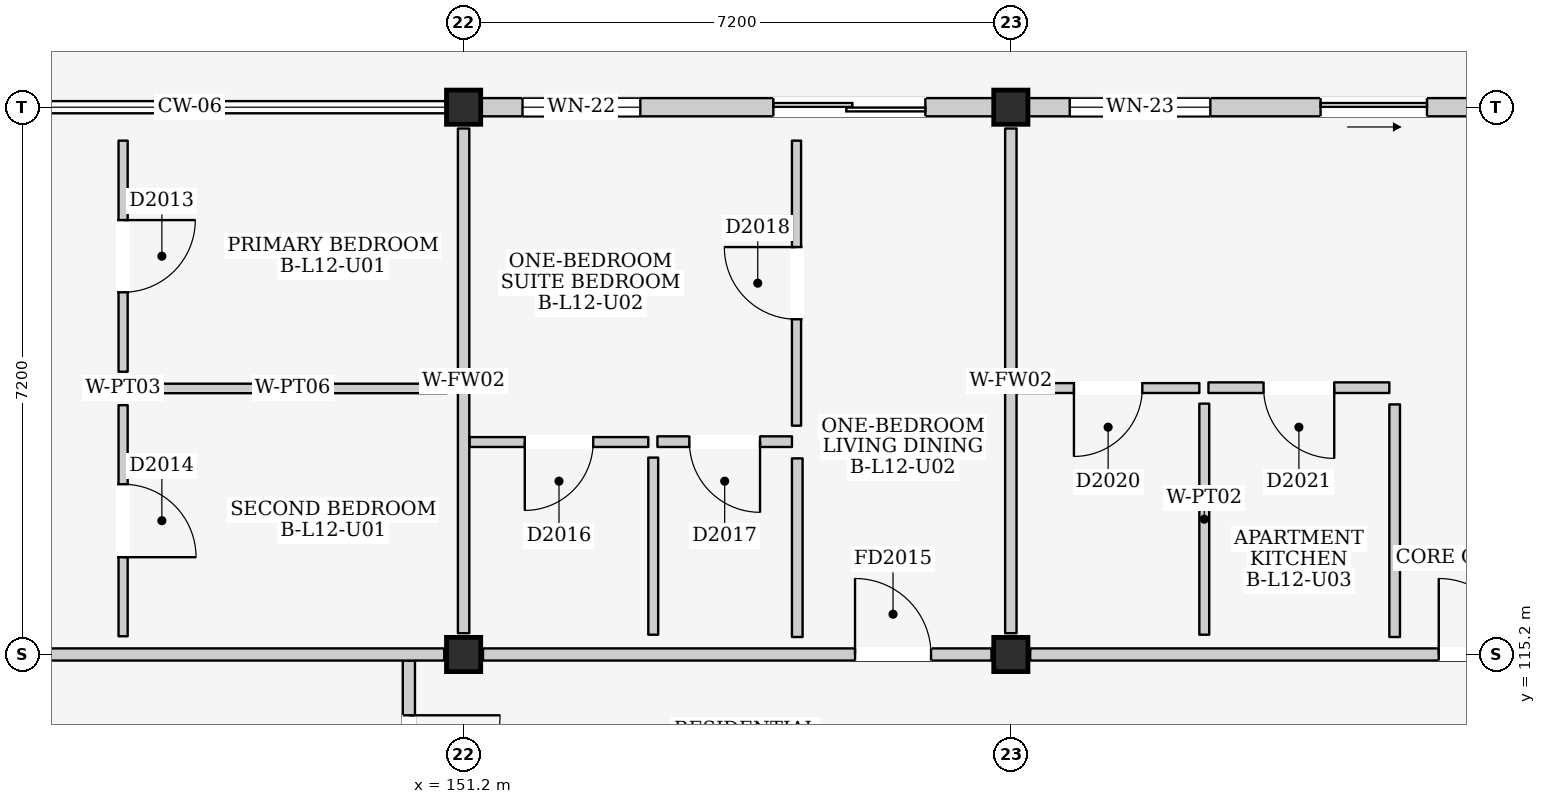
"""IFC4 building model, lengths in metres.
Left out: names, types, materials, properties, quantities, classifications, styles, units other than length and angle.
Written with IfcOpenShell. Run it as: python <this file> out.ifc"""

import sys

from ifc_helpers import new_model, si_unit, direction, frame, frame_2d, origin, origin_2d, place, context, subcontext, project, spatial, rectangle, extrude, element, fill, save


model = new_model("IFC4")
c1 = context("Model", 3, precision=1e-05, world=origin(), true_north=direction((0.0, 1.0)))
c2 = subcontext(c1, "Body", "Model", "MODEL_VIEW")
j1 = project(units=[si_unit("LENGTHUNIT", "METRE"), si_unit("PLANEANGLEUNIT", "RADIAN")], contexts=[c1])
p1 = place(None, origin())
s1 = spatial("IfcSite", under=j1, at=p1, CompositionType="ELEMENT")
p2 = place(p1, origin())
s2 = spatial("IfcBuilding", under=s1, at=p2, CompositionType="ELEMENT")
p3 = place(p2, frame((0.0, 0.0, 41.2)))
s3 = spatial("IfcBuildingStorey", under=s2, at=p3, CompositionType="ELEMENT", Elevation=41.2)
for number, where, z_axis, x_axis in (
    (1, (151.2, 115.2, 0.0), (0.0, 0.0, 1.0), (1.0, 0.0, 0.0)),
    (2, (151.2, 122.4, 0.0), (0.0, 0.0, 1.0), (1.0, 0.0, 0.0)),
    (3, (158.4, 115.2, 0.0), (0.0, 0.0, 1.0), (1.0, 0.0, 0.0)),
    (4, (158.4, 122.4, 0.0), (0.0, 0.0, 1.0), (1.0, 0.0, 0.0)),
):
    element("IfcColumn", number, at=place(p3, frame(where, z_axis=z_axis, x_axis=x_axis)), inside=s3, PredefinedType="COLUMN", context=c2, shape_type="SweptSolid", body=[
        extrude(rectangle(XDim=0.45, YDim=0.45, at=origin_2d()), origin(), (0.0, 0.0, 1.0), 3.2),
    ])
p4 = place(p3, frame((151.425, 122.4, 0.0), z_axis=(0.0, 0.0, 1.0), x_axis=(1.0, 0.0, 0.0)))
e5 = element("IfcWall", 5, at=p4, inside=s3, PredefinedType="ELEMENTEDWALL", context=c2, shape_type="SweptSolid", body=[
    extrude(rectangle(XDim=6.75, YDim=0.24, at=frame_2d((3.375, 0.0))), origin(), (0.0, 0.0, 1.0), 2.495),
])
p5 = place(p4, frame((3.85, 0.0, 0.0)))
e6 = element("IfcOpeningElement", 6, at=p5, cuts=e5, PredefinedType="OPENING", context=c2, shape_type="SweptSolid", body=[
    extrude(rectangle(XDim=2.0, YDim=2.12, at=frame_2d((1.0, 1.06))), frame((0.0, 0.135, 0.0), z_axis=(0.0, -1.0, 0.0), x_axis=(1.0, 0.0, 0.0)), (0.0, 0.0, 1.0), 0.27),
])
p6 = place(p4, frame((0.55, 0.0, 0.9)))
e7 = element("IfcOpeningElement", 7, at=p6, cuts=e5, PredefinedType="OPENING", context=c2, shape_type="SweptSolid", body=[
    extrude(rectangle(XDim=1.55, YDim=1.45, at=frame_2d((0.775, 0.725))), frame((0.0, 0.135, 0.0), z_axis=(0.0, -1.0, 0.0), x_axis=(1.0, 0.0, 0.0)), (0.0, 0.0, 1.0), 0.27),
])
p7 = place(p3, frame((158.625, 122.4, 0.0), z_axis=(0.0, 0.0, 1.0), x_axis=(1.0, 0.0, 0.0)))
e8 = element("IfcWall", 8, at=p7, inside=s3, PredefinedType="ELEMENTEDWALL", context=c2, shape_type="SweptSolid", body=[
    extrude(rectangle(XDim=6.75, YDim=0.24, at=frame_2d((3.375, 0.0))), origin(), (0.0, 0.0, 1.0), 2.495),
])
p8 = place(p7, frame((3.85, 0.0, 0.0)))
e9 = element("IfcOpeningElement", 9, at=p8, cuts=e8, PredefinedType="OPENING", context=c2, shape_type="SweptSolid", body=[
    extrude(rectangle(XDim=1.4, YDim=2.1, at=frame_2d((0.7, 1.05))), frame((0.0, 0.135, 0.0), z_axis=(0.0, -1.0, 0.0), x_axis=(1.0, 0.0, 0.0)), (0.0, 0.0, 1.0), 0.27),
])
p9 = place(p7, frame((0.55, 0.0, 0.9)))
e10 = element("IfcOpeningElement", 10, at=p9, cuts=e8, PredefinedType="OPENING", context=c2, shape_type="SweptSolid", body=[
    extrude(rectangle(XDim=1.85, YDim=1.4, at=frame_2d((0.925, 0.7))), frame((0.0, 0.135, 0.0), z_axis=(0.0, -1.0, 0.0), x_axis=(1.0, 0.0, 0.0)), (0.0, 0.0, 1.0), 0.27),
])
p10 = place(p3, frame((150.48, 111.1, 0.0), z_axis=(0.0, 0.0, 1.0), x_axis=(0.0, 1.0, 0.0)))
e11 = element("IfcWall", 11, at=p10, inside=s3, PredefinedType="PARTITIONING", context=c2, shape_type="SweptSolid", body=[
    extrude(rectangle(XDim=4.02, YDim=0.16, at=frame_2d((2.01, 0.0))), origin(), (0.0, 0.0, 1.0), 2.95),
])
p11 = place(p10, frame((2.1, 0.0, 0.0)))
e12 = element("IfcOpeningElement", 12, at=p11, cuts=e11, PredefinedType="OPENING", context=c2, shape_type="SweptSolid", body=[
    extrude(rectangle(XDim=1.2, YDim=2.2, at=frame_2d((0.6, 1.1))), frame((0.0, 0.095, 0.0), z_axis=(0.0, -1.0, 0.0), x_axis=(1.0, 0.0, 0.0)), (0.0, 0.0, 1.0), 0.19),
])
p12 = place(p3, frame((144.255, 115.2, 0.0), z_axis=(0.0, 0.0, 1.0), x_axis=(1.0, 0.0, 0.0)))
e13 = element("IfcWall", 13, at=p12, inside=s3, PredefinedType="PARTITIONING", context=c2, shape_type="SweptSolid", body=[
    extrude(rectangle(XDim=6.69, YDim=0.16, at=frame_2d((3.345, 0.0))), origin(), (0.0, 0.0, 1.0), 2.345),
])
p13 = place(p3, frame((151.2, 115.48, 0.0), z_axis=(0.0, 0.0, 1.0), x_axis=(0.0, 1.0, 0.0)))
e14 = element("IfcWall", 14, at=p13, inside=s3, PredefinedType="PARTITIONING", context=c2, shape_type="SweptSolid", body=[
    extrude(rectangle(XDim=6.64, YDim=0.15, at=frame_2d((3.32, 0.0))), origin(), (0.0, 0.0, 1.0), 2.445),
])
p14 = place(p3, frame((146.72, 118.92, 0.0), z_axis=(0.0, 0.0, 1.0), x_axis=(0.0, 1.0, 0.0)))
e15 = element("IfcWall", 15, at=p14, inside=s3, PredefinedType="PARTITIONING", context=c2, shape_type="SweptSolid", body=[
    extrude(rectangle(XDim=3.04, YDim=0.12, at=frame_2d((1.52, 0.0))), origin(), (0.0, 0.0, 1.0), 2.95),
])
p15 = place(p14, frame((1.045, 0.0, 0.0)))
e16 = element("IfcOpeningElement", 16, at=p15, cuts=e15, PredefinedType="OPENING", context=c2, shape_type="SweptSolid", body=[
    extrude(rectangle(XDim=0.95, YDim=2.15, at=frame_2d((0.475, 1.075))), frame((0.0, 0.075, 0.0), z_axis=(0.0, -1.0, 0.0), x_axis=(1.0, 0.0, 0.0)), (0.0, 0.0, 1.0), 0.15),
])
p16 = place(p3, frame((146.92, 118.7, 0.0), z_axis=(0.0, 0.0, 1.0), x_axis=(1.0, 0.0, 0.0)))
e17 = element("IfcWall", 17, at=p16, inside=s3, PredefinedType="PARTITIONING", context=c2, shape_type="SweptSolid", body=[
    extrude(rectangle(XDim=4.06, YDim=0.125, at=frame_2d((2.03, 0.0))), origin(), (0.0, 0.0, 1.0), 2.95),
])
p17 = place(p3, frame((146.72, 115.44, 0.0), z_axis=(0.0, 0.0, 1.0), x_axis=(0.0, 1.0, 0.0)))
e18 = element("IfcWall", 18, at=p17, inside=s3, PredefinedType="PARTITIONING", context=c2, shape_type="SweptSolid", body=[
    extrude(rectangle(XDim=3.04, YDim=0.12, at=frame_2d((1.52, 0.0))), origin(), (0.0, 0.0, 1.0), 2.95),
])
p18 = place(p17, frame((1.04, 0.0, 0.0)))
e19 = element("IfcOpeningElement", 19, at=p18, cuts=e18, PredefinedType="OPENING", context=c2, shape_type="SweptSolid", body=[
    extrude(rectangle(XDim=0.96, YDim=2.15, at=frame_2d((0.48, 1.075))), frame((0.0, 0.075, 0.0), z_axis=(0.0, -1.0, 0.0), x_axis=(1.0, 0.0, 0.0)), (0.0, 0.0, 1.0), 0.15),
])
p19 = place(p3, frame((151.455, 115.2, 0.0), z_axis=(0.0, 0.0, 1.0), x_axis=(1.0, 0.0, 0.0)))
e20 = element("IfcWall", 20, at=p19, inside=s3, PredefinedType="PARTITIONING", context=c2, shape_type="SweptSolid", body=[
    extrude(rectangle(XDim=6.69, YDim=0.16, at=frame_2d((3.345, 0.0))), origin(), (0.0, 0.0, 1.0), 2.345),
])
p20 = place(p19, frame((4.895, 0.0, 0.0)))
e21 = element("IfcOpeningElement", 21, at=p20, cuts=e20, PredefinedType="OPENING", context=c2, shape_type="SweptSolid", body=[
    extrude(rectangle(XDim=1.0, YDim=2.15, at=frame_2d((0.5, 1.075))), frame((0.0, 0.095, 0.0), z_axis=(0.0, -1.0, 0.0), x_axis=(1.0, 0.0, 0.0)), (0.0, 0.0, 1.0), 0.19),
])
p21 = place(p3, frame((158.4, 115.48, 0.0), z_axis=(0.0, 0.0, 1.0), x_axis=(0.0, 1.0, 0.0)))
e22 = element("IfcWall", 22, at=p21, inside=s3, PredefinedType="PARTITIONING", context=c2, shape_type="SweptSolid", body=[
    extrude(rectangle(XDim=6.64, YDim=0.15, at=frame_2d((3.32, 0.0))), origin(), (0.0, 0.0, 1.0), 2.445),
])
p22 = place(p3, frame((151.28, 117.995, 0.0), z_axis=(0.0, 0.0, 1.0), x_axis=(1.0, 0.0, 0.0)))
e23 = element("IfcWall", 23, at=p22, inside=s3, PredefinedType="PARTITIONING", context=c2, shape_type="SweptSolid", body=[
    extrude(rectangle(XDim=2.35, YDim=0.13, at=frame_2d((1.175, 0.0))), origin(), (0.0, 0.0, 1.0), 2.95),
])
p23 = place(p22, frame((0.725, 0.0, 0.0)))
e24 = element("IfcOpeningElement", 24, at=p23, cuts=e23, PredefinedType="OPENING", context=c2, shape_type="SweptSolid", body=[
    extrude(rectangle(XDim=0.9, YDim=2.1, at=frame_2d((0.45, 1.05))), frame((0.0, 0.08, 0.0), z_axis=(0.0, -1.0, 0.0), x_axis=(1.0, 0.0, 0.0)), (0.0, 0.0, 1.0), 0.16),
])
p24 = place(p3, frame((153.695, 115.46, 0.0), z_axis=(0.0, 0.0, 1.0), x_axis=(0.0, 1.0, 0.0)))
e25 = element("IfcWall", 25, at=p24, inside=s3, PredefinedType="PARTITIONING", context=c2, shape_type="SweptSolid", body=[
    extrude(rectangle(XDim=2.33, YDim=0.13, at=frame_2d((1.165, 0.0))), origin(), (0.0, 0.0, 1.0), 2.95),
])
p25 = place(p3, frame((153.75, 118.0, 0.0), z_axis=(0.0, 0.0, 1.0), x_axis=(1.0, 0.0, 0.0)))
e26 = element("IfcWall", 26, at=p25, inside=s3, PredefinedType="PARTITIONING", context=c2, shape_type="SweptSolid", body=[
    extrude(rectangle(XDim=1.77, YDim=0.14, at=frame_2d((0.885, 0.0))), origin(), (0.0, 0.0, 1.0), 2.95),
])
p26 = place(p25, frame((0.42, 0.0, 0.0)))
e27 = element("IfcOpeningElement", 27, at=p26, cuts=e26, PredefinedType="OPENING", context=c2, shape_type="SweptSolid", body=[
    extrude(rectangle(XDim=0.93, YDim=2.14, at=frame_2d((0.465, 1.07))), frame((0.0, 0.085, 0.0), z_axis=(0.0, -1.0, 0.0), x_axis=(1.0, 0.0, 0.0)), (0.0, 0.0, 1.0), 0.17),
])
p27 = place(p3, frame((155.59, 115.43, 0.0), z_axis=(0.0, 0.0, 1.0), x_axis=(0.0, 1.0, 0.0)))
e28 = element("IfcWall", 28, at=p27, inside=s3, PredefinedType="PARTITIONING", context=c2, shape_type="SweptSolid", body=[
    extrude(rectangle(XDim=2.35, YDim=0.14, at=frame_2d((1.175, 0.0))), origin(), (0.0, 0.0, 1.0), 2.95),
])
p28 = place(p3, frame((155.58, 118.21, 0.0), z_axis=(0.0, 0.0, 1.0), x_axis=(0.0, 1.0, 0.0)))
e29 = element("IfcWall", 29, at=p28, inside=s3, PredefinedType="PARTITIONING", context=c2, shape_type="SweptSolid", body=[
    extrude(rectangle(XDim=3.75, YDim=0.12, at=frame_2d((1.875, 0.0))), origin(), (0.0, 0.0, 1.0), 2.95),
])
p29 = place(p28, frame((1.4, 0.0, 0.0)))
e30 = element("IfcOpeningElement", 30, at=p29, cuts=e29, PredefinedType="OPENING", context=c2, shape_type="SweptSolid", body=[
    extrude(rectangle(XDim=0.95, YDim=2.15, at=frame_2d((0.475, 1.075))), frame((0.0, 0.075, 0.0), z_axis=(0.0, -1.0, 0.0), x_axis=(1.0, 0.0, 0.0)), (0.0, 0.0, 1.0), 0.15),
])
p30 = place(p3, frame((158.655, 115.2, 0.0), z_axis=(0.0, 0.0, 1.0), x_axis=(1.0, 0.0, 0.0)))
e31 = element("IfcWall", 31, at=p30, inside=s3, PredefinedType="PARTITIONING", context=c2, shape_type="SweptSolid", body=[
    extrude(rectangle(XDim=6.69, YDim=0.16, at=frame_2d((3.345, 0.0))), origin(), (0.0, 0.0, 1.0), 2.345),
])
p31 = place(p30, frame((5.375, 0.0, 0.0)))
e32 = element("IfcOpeningElement", 32, at=p31, cuts=e31, PredefinedType="OPENING", context=c2, shape_type="SweptSolid", body=[
    extrude(rectangle(XDim=1.0, YDim=2.15, at=frame_2d((0.5, 1.075))), frame((0.0, 0.095, 0.0), z_axis=(0.0, -1.0, 0.0), x_axis=(1.0, 0.0, 0.0)), (0.0, 0.0, 1.0), 0.19),
])
p32 = place(p3, frame((158.48, 118.705, 0.0), z_axis=(0.0, 0.0, 1.0), x_axis=(1.0, 0.0, 0.0)))
e33 = element("IfcWall", 33, at=p32, inside=s3, PredefinedType="PARTITIONING", context=c2, shape_type="SweptSolid", body=[
    extrude(rectangle(XDim=2.4, YDim=0.13, at=frame_2d((1.2, 0.0))), origin(), (0.0, 0.0, 1.0), 2.95),
])
p33 = place(p32, frame((0.75, 0.0, 0.0)))
e34 = element("IfcOpeningElement", 34, at=p33, cuts=e33, PredefinedType="OPENING", context=c2, shape_type="SweptSolid", body=[
    extrude(rectangle(XDim=0.9, YDim=2.1, at=frame_2d((0.45, 1.05))), frame((0.0, 0.08, 0.0), z_axis=(0.0, -1.0, 0.0), x_axis=(1.0, 0.0, 0.0)), (0.0, 0.0, 1.0), 0.16),
])
p34 = place(p3, frame((160.945, 115.46, 0.0), z_axis=(0.0, 0.0, 1.0), x_axis=(0.0, 1.0, 0.0)))
e35 = element("IfcWall", 35, at=p34, inside=s3, PredefinedType="PARTITIONING", context=c2, shape_type="SweptSolid", body=[
    extrude(rectangle(XDim=3.04, YDim=0.13, at=frame_2d((1.52, 0.0))), origin(), (0.0, 0.0, 1.0), 2.95),
])
p35 = place(p3, frame((161.0, 118.71, 0.0), z_axis=(0.0, 0.0, 1.0), x_axis=(1.0, 0.0, 0.0)))
e36 = element("IfcWall", 36, at=p35, inside=s3, PredefinedType="PARTITIONING", context=c2, shape_type="SweptSolid", body=[
    extrude(rectangle(XDim=2.38, YDim=0.14, at=frame_2d((1.19, 0.0))), origin(), (0.0, 0.0, 1.0), 2.95),
])
p36 = place(p35, frame((0.725, 0.0, 0.0)))
e37 = element("IfcOpeningElement", 37, at=p36, cuts=e36, PredefinedType="OPENING", context=c2, shape_type="SweptSolid", body=[
    extrude(rectangle(XDim=0.93, YDim=2.14, at=frame_2d((0.465, 1.07))), frame((0.0, 0.085, 0.0), z_axis=(0.0, -1.0, 0.0), x_axis=(1.0, 0.0, 0.0)), (0.0, 0.0, 1.0), 0.17),
])
p37 = place(p3, frame((163.45, 115.43, 0.0), z_axis=(0.0, 0.0, 1.0), x_axis=(0.0, 1.0, 0.0)))
e38 = element("IfcWall", 38, at=p37, inside=s3, PredefinedType="PARTITIONING", context=c2, shape_type="SweptSolid", body=[
    extrude(rectangle(XDim=3.06, YDim=0.14, at=frame_2d((1.53, 0.0))), origin(), (0.0, 0.0, 1.0), 2.95),
])
p38 = place(p5, frame((2.0, 0.0, 0.0), z_axis=(0.0, 0.0, 1.0), x_axis=(-1.0, 0.0, 0.0)))
e39 = element("IfcDoor", 39, at=p38, inside=s3, OperationType="DOUBLE_DOOR_SLIDING", PredefinedType="DOOR", context=c2, shape_type="SweptSolid", body=[
    extrude(rectangle(XDim=2.0, YDim=2.12, at=frame_2d((1.0, 1.06))), frame((0.0, 0.025, 0.0), z_axis=(0.0, -1.0, 0.0), x_axis=(1.0, 0.0, 0.0)), (0.0, 0.0, 1.0), 0.05),
])
fill(e6, e39)
p39 = place(p6, origin())
e40 = element("IfcWindow", 40, at=p39, inside=s3, PartitioningType="DOUBLE_PANEL_VERTICAL", PredefinedType="WINDOW", context=c2, shape_type="SweptSolid", body=[
    extrude(rectangle(XDim=1.55, YDim=1.45, at=frame_2d((0.775, 0.725))), frame((0.0, 0.03, 0.0), z_axis=(0.0, -1.0, 0.0), x_axis=(1.0, 0.0, 0.0)), (0.0, 0.0, 1.0), 0.06),
])
fill(e7, e40)
p40 = place(p8, frame((1.4, 0.0, 0.0), z_axis=(0.0, 0.0, 1.0), x_axis=(-1.0, 0.0, 0.0)))
e41 = element("IfcDoor", 41, at=p40, inside=s3, OperationType="SLIDING_TO_RIGHT", PredefinedType="DOOR", context=c2, shape_type="SweptSolid", body=[
    extrude(rectangle(XDim=1.4, YDim=2.1, at=frame_2d((0.7, 1.05))), frame((0.0, 0.025, 0.0), z_axis=(0.0, -1.0, 0.0), x_axis=(1.0, 0.0, 0.0)), (0.0, 0.0, 1.0), 0.05),
])
fill(e9, e41)
p41 = place(p9, origin())
e42 = element("IfcWindow", 42, at=p41, inside=s3, PartitioningType="DOUBLE_PANEL_VERTICAL", PredefinedType="WINDOW", context=c2, shape_type="SweptSolid", body=[
    extrude(rectangle(XDim=1.85, YDim=1.4, at=frame_2d((0.925, 0.7))), frame((0.0, 0.03, 0.0), z_axis=(0.0, -1.0, 0.0), x_axis=(1.0, 0.0, 0.0)), (0.0, 0.0, 1.0), 0.06),
])
fill(e10, e42)
p42 = place(p11, frame((1.2, 0.0, 0.0), z_axis=(0.0, 0.0, 1.0), x_axis=(-1.0, 0.0, 0.0)))
e43 = element("IfcDoor", 43, at=p42, inside=s3, OperationType="SINGLE_SWING_LEFT", PredefinedType="DOOR", context=c2, shape_type="SweptSolid", body=[
    extrude(rectangle(XDim=1.2, YDim=2.2, at=frame_2d((0.6, 1.1))), frame((0.0, 0.025, 0.0), z_axis=(0.0, -1.0, 0.0), x_axis=(1.0, 0.0, 0.0)), (0.0, 0.0, 1.0), 0.05),
])
fill(e12, e43)
p43 = place(p15, frame((0.95, 0.0, 0.0), z_axis=(0.0, 0.0, 1.0), x_axis=(-1.0, 0.0, 0.0)))
e44 = element("IfcDoor", 44, at=p43, inside=s3, OperationType="SINGLE_SWING_LEFT", PredefinedType="DOOR", context=c2, shape_type="SweptSolid", body=[
    extrude(rectangle(XDim=0.95, YDim=2.15, at=frame_2d((0.475, 1.075))), frame((0.0, 0.025, 0.0), z_axis=(0.0, -1.0, 0.0), x_axis=(1.0, 0.0, 0.0)), (0.0, 0.0, 1.0), 0.05),
])
fill(e16, e44)
p44 = place(p18, frame((0.96, 0.0, 0.0), z_axis=(0.0, 0.0, 1.0), x_axis=(-1.0, 0.0, 0.0)))
e45 = element("IfcDoor", 45, at=p44, inside=s3, OperationType="SINGLE_SWING_RIGHT", PredefinedType="DOOR", context=c2, shape_type="SweptSolid", body=[
    extrude(rectangle(XDim=0.96, YDim=2.15, at=frame_2d((0.48, 1.075))), frame((0.0, 0.025, 0.0), z_axis=(0.0, -1.0, 0.0), x_axis=(1.0, 0.0, 0.0)), (0.0, 0.0, 1.0), 0.05),
])
fill(e19, e45)
p45 = place(p20, origin())
e46 = element("IfcDoor", 46, at=p45, inside=s3, OperationType="SINGLE_SWING_LEFT", PredefinedType="DOOR", context=c2, shape_type="SweptSolid", body=[
    extrude(rectangle(XDim=1.0, YDim=2.15, at=frame_2d((0.5, 1.075))), frame((0.0, 0.025, 0.0), z_axis=(0.0, -1.0, 0.0), x_axis=(1.0, 0.0, 0.0)), (0.0, 0.0, 1.0), 0.05),
])
fill(e21, e46)
p46 = place(p23, frame((0.9, 0.0, 0.0), z_axis=(0.0, 0.0, 1.0), x_axis=(-1.0, 0.0, 0.0)))
e47 = element("IfcDoor", 47, at=p46, inside=s3, OperationType="SINGLE_SWING_RIGHT", PredefinedType="DOOR", context=c2, shape_type="SweptSolid", body=[
    extrude(rectangle(XDim=0.9, YDim=2.1, at=frame_2d((0.45, 1.05))), frame((0.0, 0.025, 0.0), z_axis=(0.0, -1.0, 0.0), x_axis=(1.0, 0.0, 0.0)), (0.0, 0.0, 1.0), 0.05),
])
fill(e24, e47)
p47 = place(p26, frame((0.93, 0.0, 0.0), z_axis=(0.0, 0.0, 1.0), x_axis=(-1.0, 0.0, 0.0)))
e48 = element("IfcDoor", 48, at=p47, inside=s3, OperationType="SINGLE_SWING_LEFT", PredefinedType="DOOR", context=c2, shape_type="SweptSolid", body=[
    extrude(rectangle(XDim=0.93, YDim=2.14, at=frame_2d((0.465, 1.07))), frame((0.0, 0.025, 0.0), z_axis=(0.0, -1.0, 0.0), x_axis=(1.0, 0.0, 0.0)), (0.0, 0.0, 1.0), 0.05),
])
fill(e27, e48)
p48 = place(p29, origin())
e49 = element("IfcDoor", 49, at=p48, inside=s3, OperationType="SINGLE_SWING_RIGHT", PredefinedType="DOOR", context=c2, shape_type="SweptSolid", body=[
    extrude(rectangle(XDim=0.95, YDim=2.15, at=frame_2d((0.475, 1.075))), frame((0.0, 0.025, 0.0), z_axis=(0.0, -1.0, 0.0), x_axis=(1.0, 0.0, 0.0)), (0.0, 0.0, 1.0), 0.05),
])
fill(e30, e49)
p49 = place(p31, origin())
e50 = element("IfcDoor", 50, at=p49, inside=s3, OperationType="SINGLE_SWING_LEFT", PredefinedType="DOOR", context=c2, shape_type="SweptSolid", body=[
    extrude(rectangle(XDim=1.0, YDim=2.15, at=frame_2d((0.5, 1.075))), frame((0.0, 0.025, 0.0), z_axis=(0.0, -1.0, 0.0), x_axis=(1.0, 0.0, 0.0)), (0.0, 0.0, 1.0), 0.05),
])
fill(e32, e50)
p50 = place(p33, frame((0.9, 0.0, 0.0), z_axis=(0.0, 0.0, 1.0), x_axis=(-1.0, 0.0, 0.0)))
e51 = element("IfcDoor", 51, at=p50, inside=s3, OperationType="SINGLE_SWING_RIGHT", PredefinedType="DOOR", context=c2, shape_type="SweptSolid", body=[
    extrude(rectangle(XDim=0.9, YDim=2.1, at=frame_2d((0.45, 1.05))), frame((0.0, 0.025, 0.0), z_axis=(0.0, -1.0, 0.0), x_axis=(1.0, 0.0, 0.0)), (0.0, 0.0, 1.0), 0.05),
])
fill(e34, e51)
p51 = place(p36, frame((0.93, 0.0, 0.0), z_axis=(0.0, 0.0, 1.0), x_axis=(-1.0, 0.0, 0.0)))
e52 = element("IfcDoor", 52, at=p51, inside=s3, OperationType="SINGLE_SWING_LEFT", PredefinedType="DOOR", context=c2, shape_type="SweptSolid", body=[
    extrude(rectangle(XDim=0.93, YDim=2.14, at=frame_2d((0.465, 1.07))), frame((0.0, 0.025, 0.0), z_axis=(0.0, -1.0, 0.0), x_axis=(1.0, 0.0, 0.0)), (0.0, 0.0, 1.0), 0.05),
])
fill(e37, e52)
save(model, sys.argv[1])
